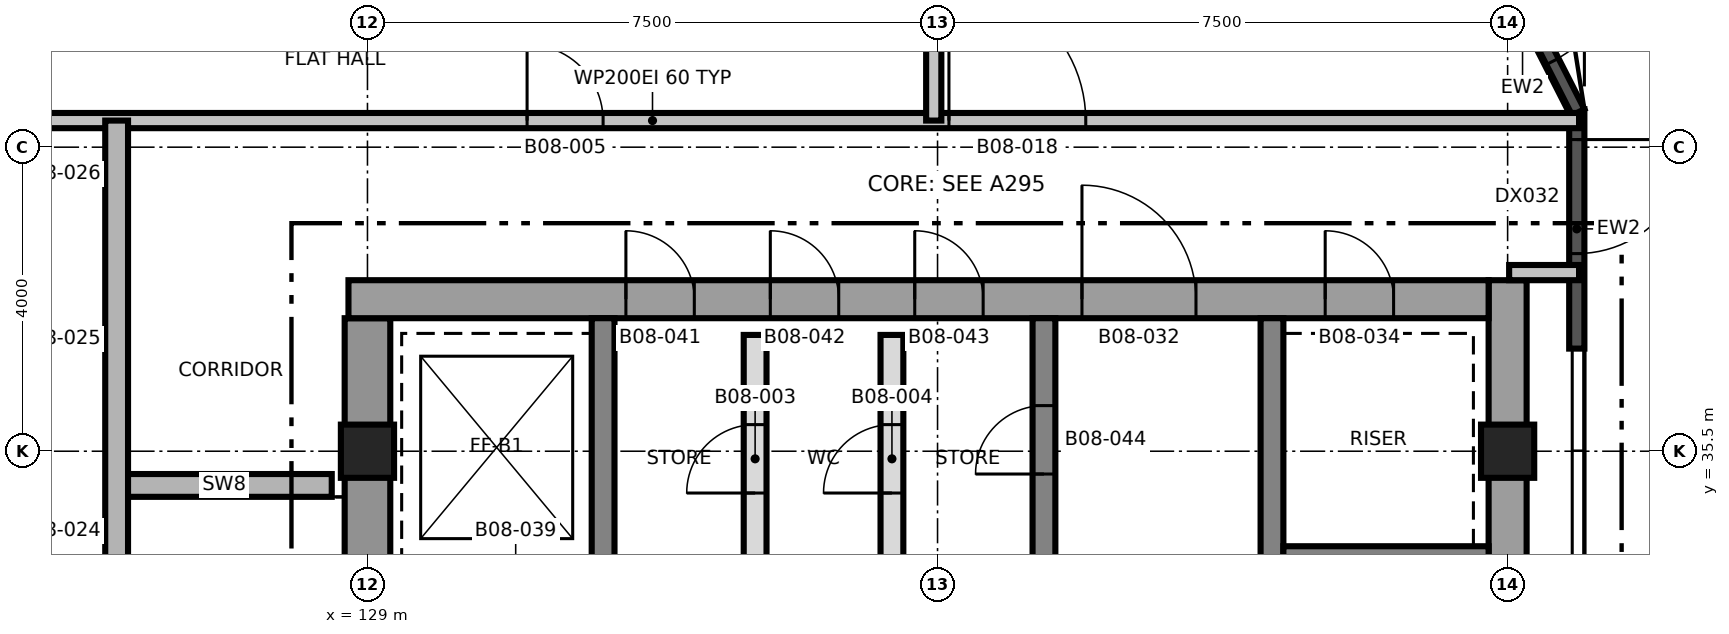
"""IFC4 building model, lengths in metres.
Left out: names, types, materials, properties, quantities, classifications, styles, units other than length and angle.
Written with IfcOpenShell. Run it as: python <this file> out.ifc"""

import sys

from ifc_helpers import new_model, si_unit, direction, frame, frame_2d, origin, origin_2d, place, context, subcontext, project, spatial, rectangle, extrude, element, fill, save


model = new_model("IFC4")
c1 = context("Model", 3, precision=1e-05, world=origin(), true_north=direction((0.0, 1.0)))
c2 = subcontext(c1, "Body", "Model", "MODEL_VIEW")
j1 = project(units=[si_unit("LENGTHUNIT", "METRE"), si_unit("PLANEANGLEUNIT", "RADIAN")], contexts=[c1])
p1 = place(None, origin())
s1 = spatial("IfcSite", under=j1, at=p1, CompositionType="ELEMENT")
p2 = place(p1, origin())
s2 = spatial("IfcBuilding", under=s1, at=p2, CompositionType="ELEMENT")
p3 = place(p2, frame((0.0, 0.0, 94.5)))
s3 = spatial("IfcBuildingStorey", under=s2, at=p3, CompositionType="ELEMENT", Elevation=94.5)
p4 = place(p3, frame((129.0, 24.75, 0.0), z_axis=(0.0, 0.0, 1.0), x_axis=(0.0, 1.0, 0.0)))
e1 = element("IfcWall", 1, at=p4, inside=s3, PredefinedType="SHEAR", context=c2, shape_type="SweptSolid", body=[
    extrude(rectangle(XDim=12.5, YDim=0.6, at=frame_2d((6.25, 0.0))), origin(), (0.0, 0.0, 1.0), 3.7),
])
p5 = place(p4, frame((5.15, 0.0, 0.0)))
e2 = element("IfcOpeningElement", 2, at=p5, cuts=e1, PredefinedType="OPENING", context=c2, shape_type="SweptSolid", body=[
    extrude(rectangle(XDim=1.0, YDim=2.1, at=frame_2d((0.5, 1.05))), frame((0.0, 0.31, 0.0), z_axis=(0.0, -1.0, 0.0), x_axis=(1.0, 0.0, 0.0)), (0.0, 0.0, 1.0), 0.62),
])
p6 = place(p3, frame((144.0, 24.25, 0.0), z_axis=(0.0, 0.0, 1.0), x_axis=(0.0, 1.0, 0.0)))
e3 = element("IfcWall", 3, at=p6, inside=s3, PredefinedType="SHEAR", context=c2, shape_type="SweptSolid", body=[
    extrude(rectangle(XDim=13.5, YDim=0.5, at=frame_2d((6.75, 0.0))), origin(), (0.0, 0.0, 1.0), 3.7),
])
p7 = place(p3, frame((128.75, 37.5, 0.0), z_axis=(0.0, 0.0, 1.0), x_axis=(1.0, 0.0, 0.0)))
e4 = element("IfcWall", 4, at=p7, inside=s3, PredefinedType="SHEAR", context=c2, shape_type="SweptSolid", body=[
    extrude(rectangle(XDim=15.0, YDim=0.5, at=frame_2d((7.5, 0.0))), origin(), (0.0, 0.0, 1.0), 3.7),
])
p8 = place(p7, frame((9.65, 0.0, 0.0)))
e5 = element("IfcOpeningElement", 5, at=p8, cuts=e4, PredefinedType="OPENING", context=c2, shape_type="SweptSolid", body=[
    extrude(rectangle(XDim=1.5, YDim=2.1, at=frame_2d((0.75, 1.05))), frame((0.0, 0.26, 0.0), z_axis=(0.0, -1.0, 0.0), x_axis=(1.0, 0.0, 0.0)), (0.0, 0.0, 1.0), 0.52),
])
p9 = place(p7, frame((12.85, 0.0, 0.0)))
e6 = element("IfcOpeningElement", 6, at=p9, cuts=e4, PredefinedType="OPENING", context=c2, shape_type="SweptSolid", body=[
    extrude(rectangle(XDim=0.9, YDim=2.1, at=frame_2d((0.45, 1.05))), frame((0.0, 0.26, 0.0), z_axis=(0.0, -1.0, 0.0), x_axis=(1.0, 0.0, 0.0)), (0.0, 0.0, 1.0), 0.52),
])
p10 = place(p7, frame((3.65, 0.0, 0.0)))
e7 = element("IfcOpeningElement", 7, at=p10, cuts=e4, PredefinedType="OPENING", context=c2, shape_type="SweptSolid", body=[
    extrude(rectangle(XDim=0.9, YDim=2.1, at=frame_2d((0.45, 1.05))), frame((0.0, 0.26, 0.0), z_axis=(0.0, -1.0, 0.0), x_axis=(1.0, 0.0, 0.0)), (0.0, 0.0, 1.0), 0.52),
])
p11 = place(p7, frame((5.55, 0.0, 0.0)))
e8 = element("IfcOpeningElement", 8, at=p11, cuts=e4, PredefinedType="OPENING", context=c2, shape_type="SweptSolid", body=[
    extrude(rectangle(XDim=0.9, YDim=2.1, at=frame_2d((0.45, 1.05))), frame((0.0, 0.26, 0.0), z_axis=(0.0, -1.0, 0.0), x_axis=(1.0, 0.0, 0.0)), (0.0, 0.0, 1.0), 0.52),
])
p12 = place(p7, frame((7.45, 0.0, 0.0)))
e9 = element("IfcOpeningElement", 9, at=p12, cuts=e4, PredefinedType="OPENING", context=c2, shape_type="SweptSolid", body=[
    extrude(rectangle(XDim=0.9, YDim=2.1, at=frame_2d((0.45, 1.05))), frame((0.0, 0.26, 0.0), z_axis=(0.0, -1.0, 0.0), x_axis=(1.0, 0.0, 0.0)), (0.0, 0.0, 1.0), 0.52),
])
p13 = place(p3, frame((132.1, 24.75, 0.0), z_axis=(0.0, 0.0, 1.0), x_axis=(0.0, 1.0, 0.0)))
e10 = element("IfcWall", 10, at=p13, inside=s3, PredefinedType="SHEAR", context=c2, shape_type="SweptSolid", body=[
    extrude(rectangle(XDim=12.5, YDim=0.3, at=frame_2d((6.25, 0.0))), origin(), (0.0, 0.0, 1.0), 3.7),
])
p14 = place(p13, frame((3.9, 0.0, 0.0)))
e11 = element("IfcOpeningElement", 11, at=p14, cuts=e10, PredefinedType="OPENING", context=c2, shape_type="SweptSolid", body=[
    extrude(rectangle(XDim=1.2, YDim=2.1, at=frame_2d((0.6, 1.05))), frame((0.0, 0.16, 0.0), z_axis=(0.0, -1.0, 0.0), x_axis=(1.0, 0.0, 0.0)), (0.0, 0.0, 1.0), 0.32),
])
p15 = place(p3, frame((137.9, 24.75, 0.0), z_axis=(0.0, 0.0, 1.0), x_axis=(0.0, 1.0, 0.0)))
e12 = element("IfcWall", 12, at=p15, inside=s3, PredefinedType="SHEAR", context=c2, shape_type="SweptSolid", body=[
    extrude(rectangle(XDim=12.5, YDim=0.3, at=frame_2d((6.25, 0.0))), origin(), (0.0, 0.0, 1.0), 3.7),
])
p16 = place(p15, frame((3.95, 0.0, 0.0)))
e13 = element("IfcOpeningElement", 13, at=p16, cuts=e12, PredefinedType="OPENING", context=c2, shape_type="SweptSolid", body=[
    extrude(rectangle(XDim=1.5, YDim=2.1, at=frame_2d((0.75, 1.05))), frame((0.0, 0.16, 0.0), z_axis=(0.0, -1.0, 0.0), x_axis=(1.0, 0.0, 0.0)), (0.0, 0.0, 1.0), 0.32),
])
p17 = place(p15, frame((10.45, 0.0, 0.0)))
e14 = element("IfcOpeningElement", 14, at=p17, cuts=e12, PredefinedType="OPENING", context=c2, shape_type="SweptSolid", body=[
    extrude(rectangle(XDim=0.9, YDim=2.1, at=frame_2d((0.45, 1.05))), frame((0.0, 0.16, 0.0), z_axis=(0.0, -1.0, 0.0), x_axis=(1.0, 0.0, 0.0)), (0.0, 0.0, 1.0), 0.32),
])
p18 = place(p3, frame((140.9, 24.75, 0.0), z_axis=(0.0, 0.0, 1.0), x_axis=(0.0, 1.0, 0.0)))
e15 = element("IfcWall", 15, at=p18, inside=s3, PredefinedType="SHEAR", context=c2, shape_type="SweptSolid", body=[
    extrude(rectangle(XDim=12.5, YDim=0.3, at=frame_2d((6.25, 0.0))), origin(), (0.0, 0.0, 1.0), 3.7),
])
p19 = place(p18, frame((5.9, 0.0, 0.0)))
e16 = element("IfcOpeningElement", 16, at=p19, cuts=e15, PredefinedType="OPENING", context=c2, shape_type="SweptSolid", body=[
    extrude(rectangle(XDim=1.2, YDim=2.1, at=frame_2d((0.6, 1.05))), frame((0.0, 0.16, 0.0), z_axis=(0.0, -1.0, 0.0), x_axis=(1.0, 0.0, 0.0)), (0.0, 0.0, 1.0), 0.32),
])
p20 = place(p3, frame((141.05, 34.1, 0.0), z_axis=(0.0, 0.0, 1.0), x_axis=(1.0, 0.0, 0.0)))
e17 = element("IfcWall", 17, at=p20, inside=s3, PredefinedType="SHEAR", context=c2, shape_type="SweptSolid", body=[
    extrude(rectangle(XDim=2.7, YDim=0.3, at=frame_2d((1.35, 0.0))), origin(), (0.0, 0.0, 1.0), 3.7),
])
for number, where, z_axis, x_axis in (
    (18, (129.0, 35.5, 0.0), (0.0, 0.0, 1.0), (1.0, 0.0, 0.0)),
    (19, (144.0, 35.5, 0.0), (0.0, 0.0, 1.0), (1.0, 0.0, 0.0)),
):
    element("IfcColumn", number, at=place(p3, frame(where, z_axis=z_axis, x_axis=x_axis)), inside=s3, PredefinedType="COLUMN", context=c2, shape_type="SweptSolid", body=[
        extrude(rectangle(XDim=0.7, YDim=0.7, at=origin_2d()), origin(), (0.0, 0.0, 1.0), 3.7),
    ])
p21 = place(p3, frame((144.91, 40.0, 0.0), z_axis=(0.0, 0.0, 1.0), x_axis=(0.0, -1.0, 0.0)))
e20 = element("IfcWall", 20, at=p21, inside=s3, PredefinedType="SOLIDWALL", context=c2, shape_type="SweptSolid", body=[
    extrude(rectangle(XDim=3.15, YDim=0.2, at=frame_2d((1.575, 0.0))), origin(), (0.0, 0.0, 1.0), 3.4),
])
p22 = place(p21, frame((0.4, 0.0, 0.0)))
e21 = element("IfcOpeningElement", 21, at=p22, cuts=e20, PredefinedType="OPENING", context=c2, shape_type="SweptSolid", body=[
    extrude(rectangle(XDim=1.5, YDim=2.4, at=frame_2d((0.75, 1.2))), frame((0.0, 0.11, 0.0), z_axis=(0.0, -1.0, 0.0), x_axis=(1.0, 0.0, 0.0)), (0.0, 0.0, 1.0), 0.22),
])
p23 = place(p3, frame((143.472, 42.799, 0.0), z_axis=(0.0, 0.0, 1.0), x_axis=(0.453962447346, -0.89102081704, 0.0)))
e22 = element("IfcWall", 22, at=p23, inside=s3, PredefinedType="SOLIDWALL", context=c2, shape_type="SweptSolid", body=[
    extrude(rectangle(XDim=3.192, YDim=0.2, at=frame_2d((1.596, 0.0))), origin(), (0.0, 0.0, 1.0), 3.4),
])
p24 = place(p23, frame((0.642, 0.0, 0.0)))
e23 = element("IfcOpeningElement", 23, at=p24, cuts=e22, PredefinedType="OPENING", context=c2, shape_type="SweptSolid", body=[
    extrude(rectangle(XDim=1.8, YDim=2.4, at=frame_2d((0.9, 1.2))), frame((0.0, 0.11, 0.0), z_axis=(0.0, -1.0, 0.0), x_axis=(1.0, 0.0, 0.0)), (0.0, 0.0, 1.0), 0.22),
])
p25 = place(p3, frame((125.7, 35.05, 0.0), z_axis=(0.0, 0.0, 1.0), x_axis=(1.0, 0.0, 0.0)))
e24 = element("IfcWall", 24, at=p25, inside=s3, PredefinedType="SHEAR", context=c2, shape_type="SweptSolid", body=[
    extrude(rectangle(XDim=2.83, YDim=0.3, at=frame_2d((1.415, 0.0))), origin(), (0.0, 0.0, 1.0), 3.4),
])
p26 = place(p3, frame((144.02, 37.85, 0.0), z_axis=(0.0, 0.0, 1.0), x_axis=(1.0, 0.0, 0.0)))
e25 = element("IfcWall", 25, at=p26, inside=s3, PredefinedType="PARTITIONING", context=c2, shape_type="SweptSolid", body=[
    extrude(rectangle(XDim=0.92, YDim=0.2, at=frame_2d((0.46, 0.0))), origin(), (0.0, 0.0, 1.0), 3.4),
])
p27 = place(p3, frame((120.56, 39.85, 0.0), z_axis=(0.0, 0.0, 1.0), x_axis=(1.0, 0.0, 0.0)))
e26 = element("IfcWall", 26, at=p27, inside=s3, PredefinedType="PARTITIONING", context=c2, shape_type="SweptSolid", body=[
    extrude(rectangle(XDim=24.38, YDim=0.2, at=frame_2d((12.19, 0.0))), origin(), (0.0, 0.0, 1.0), 3.4),
])
p28 = place(p27, frame((10.54, 0.0, 0.0)))
e27 = element("IfcOpeningElement", 27, at=p28, cuts=e26, PredefinedType="OPENING", context=c2, shape_type="SweptSolid", body=[
    extrude(rectangle(XDim=1.0, YDim=2.1, at=frame_2d((0.5, 1.05))), frame((0.0, 0.11, 0.0), z_axis=(0.0, -1.0, 0.0), x_axis=(1.0, 0.0, 0.0)), (0.0, 0.0, 1.0), 0.22),
])
p29 = place(p27, frame((16.09, 0.0, 0.0)))
e28 = element("IfcOpeningElement", 28, at=p29, cuts=e26, PredefinedType="OPENING", context=c2, shape_type="SweptSolid", body=[
    extrude(rectangle(XDim=1.8, YDim=2.1, at=frame_2d((0.9, 1.05))), frame((0.0, 0.11, 0.0), z_axis=(0.0, -1.0, 0.0), x_axis=(1.0, 0.0, 0.0)), (0.0, 0.0, 1.0), 0.22),
])
p30 = place(p3, frame((125.7, 22.15, 0.0), z_axis=(0.0, 0.0, 1.0), x_axis=(0.0, 1.0, 0.0)))
e29 = element("IfcWall", 29, at=p30, inside=s3, PredefinedType="SHEAR", context=c2, shape_type="SweptSolid", body=[
    extrude(rectangle(XDim=17.7, YDim=0.3, at=frame_2d((8.85, 0.0))), origin(), (0.0, 0.0, 1.0), 3.4),
])
p31 = place(p30, frame((2.7, 0.0, 0.0)))
e30 = element("IfcOpeningElement", 30, at=p31, cuts=e29, PredefinedType="OPENING", context=c2, shape_type="SweptSolid", body=[
    extrude(rectangle(XDim=1.0, YDim=2.1, at=frame_2d((0.5, 1.05))), frame((0.0, 0.16, 0.0), z_axis=(0.0, -1.0, 0.0), x_axis=(1.0, 0.0, 0.0)), (0.0, 0.0, 1.0), 0.32),
])
p32 = place(p3, frame((134.1, 33.77, 0.0), z_axis=(0.0, 0.0, 1.0), x_axis=(0.0, 1.0, 0.0)))
e31 = element("IfcWall", 31, at=p32, inside=s3, PredefinedType="PARTITIONING", context=c2, shape_type="SweptSolid", body=[
    extrude(rectangle(XDim=3.26, YDim=0.3, at=frame_2d((1.63, 0.0))), origin(), (0.0, 0.0, 1.0), 3.4),
])
p33 = place(p32, frame((1.18, 0.0, 0.0)))
e32 = element("IfcOpeningElement", 32, at=p33, cuts=e31, PredefinedType="OPENING", context=c2, shape_type="SweptSolid", body=[
    extrude(rectangle(XDim=0.9, YDim=2.1, at=frame_2d((0.45, 1.05))), frame((0.0, 0.16, 0.0), z_axis=(0.0, -1.0, 0.0), x_axis=(1.0, 0.0, 0.0)), (0.0, 0.0, 1.0), 0.32),
])
p34 = place(p3, frame((135.9, 33.77, 0.0), z_axis=(0.0, 0.0, 1.0), x_axis=(0.0, 1.0, 0.0)))
e33 = element("IfcWall", 33, at=p34, inside=s3, PredefinedType="PARTITIONING", context=c2, shape_type="SweptSolid", body=[
    extrude(rectangle(XDim=3.26, YDim=0.3, at=frame_2d((1.63, 0.0))), origin(), (0.0, 0.0, 1.0), 3.4),
])
p35 = place(p34, frame((1.18, 0.0, 0.0)))
e34 = element("IfcOpeningElement", 34, at=p35, cuts=e33, PredefinedType="OPENING", context=c2, shape_type="SweptSolid", body=[
    extrude(rectangle(XDim=0.9, YDim=2.1, at=frame_2d((0.45, 1.05))), frame((0.0, 0.16, 0.0), z_axis=(0.0, -1.0, 0.0), x_axis=(1.0, 0.0, 0.0)), (0.0, 0.0, 1.0), 0.32),
])
p36 = place(p3, frame((136.45, 39.85, 0.0), z_axis=(0.0, 0.0, 1.0), x_axis=(0.0, 1.0, 0.0)))
e35 = element("IfcWall", 35, at=p36, inside=s3, PredefinedType="PARTITIONING", context=c2, shape_type="SweptSolid", body=[
    extrude(rectangle(XDim=5.59, YDim=0.2, at=frame_2d((2.795, 0.0))), origin(), (0.0, 0.0, 1.0), 3.4),
])
p37 = place(p22, origin())
e36 = element("IfcDoor", 36, at=p37, inside=s3, OperationType="SINGLE_SWING_LEFT", PredefinedType="DOOR", context=c2, shape_type="SweptSolid", body=[
    extrude(rectangle(XDim=1.5, YDim=2.4, at=frame_2d((0.75, 1.2))), frame((0.0, 0.025, 0.0), z_axis=(0.0, -1.0, 0.0), x_axis=(1.0, 0.0, 0.0)), (0.0, 0.0, 1.0), 0.05),
])
fill(e21, e36)
p38 = place(p24, origin())
e37 = element("IfcDoor", 37, at=p38, inside=s3, OperationType="SINGLE_SWING_LEFT", PredefinedType="DOOR", context=c2, shape_type="SweptSolid", body=[
    extrude(rectangle(XDim=1.8, YDim=2.4, at=frame_2d((0.9, 1.2))), frame((0.0, 0.025, 0.0), z_axis=(0.0, -1.0, 0.0), x_axis=(1.0, 0.0, 0.0)), (0.0, 0.0, 1.0), 0.05),
])
fill(e23, e37)
p39 = place(p33, origin())
e38 = element("IfcDoor", 38, at=p39, inside=s3, OperationType="SINGLE_SWING_LEFT", PredefinedType="DOOR", context=c2, shape_type="SweptSolid", body=[
    extrude(rectangle(XDim=0.9, YDim=2.1, at=frame_2d((0.45, 1.05))), frame((0.0, 0.025, 0.0), z_axis=(0.0, -1.0, 0.0), x_axis=(1.0, 0.0, 0.0)), (0.0, 0.0, 1.0), 0.05),
])
fill(e32, e38)
p40 = place(p35, origin())
e39 = element("IfcDoor", 39, at=p40, inside=s3, OperationType="SINGLE_SWING_RIGHT", PredefinedType="DOOR", context=c2, shape_type="SweptSolid", body=[
    extrude(rectangle(XDim=0.9, YDim=2.1, at=frame_2d((0.45, 1.05))), frame((0.0, 0.025, 0.0), z_axis=(0.0, -1.0, 0.0), x_axis=(1.0, 0.0, 0.0)), (0.0, 0.0, 1.0), 0.05),
])
fill(e34, e39)
p41 = place(p28, origin())
e40 = element("IfcDoor", 40, at=p41, inside=s3, OperationType="SINGLE_SWING_LEFT", PredefinedType="DOOR", context=c2, shape_type="SweptSolid", body=[
    extrude(rectangle(XDim=1.0, YDim=2.1, at=frame_2d((0.5, 1.05))), frame((0.0, 0.025, 0.0), z_axis=(0.0, -1.0, 0.0), x_axis=(1.0, 0.0, 0.0)), (0.0, 0.0, 1.0), 0.05),
])
fill(e27, e40)
p42 = place(p29, origin())
e41 = element("IfcDoor", 41, at=p42, inside=s3, OperationType="SINGLE_SWING_RIGHT", PredefinedType="DOOR", context=c2, shape_type="SweptSolid", body=[
    extrude(rectangle(XDim=1.8, YDim=2.1, at=frame_2d((0.9, 1.05))), frame((0.0, 0.025, 0.0), z_axis=(0.0, -1.0, 0.0), x_axis=(1.0, 0.0, 0.0)), (0.0, 0.0, 1.0), 0.05),
])
fill(e28, e41)
p43 = place(p8, origin())
e42 = element("IfcDoor", 42, at=p43, inside=s3, OperationType="SINGLE_SWING_RIGHT", PredefinedType="DOOR", context=c2, shape_type="SweptSolid", body=[
    extrude(rectangle(XDim=1.5, YDim=2.1, at=frame_2d((0.75, 1.05))), frame((0.0, 0.025, 0.0), z_axis=(0.0, -1.0, 0.0), x_axis=(1.0, 0.0, 0.0)), (0.0, 0.0, 1.0), 0.05),
])
fill(e5, e42)
p44 = place(p9, origin())
e43 = element("IfcDoor", 43, at=p44, inside=s3, OperationType="SINGLE_SWING_RIGHT", PredefinedType="DOOR", context=c2, shape_type="SweptSolid", body=[
    extrude(rectangle(XDim=0.9, YDim=2.1, at=frame_2d((0.45, 1.05))), frame((0.0, 0.025, 0.0), z_axis=(0.0, -1.0, 0.0), x_axis=(1.0, 0.0, 0.0)), (0.0, 0.0, 1.0), 0.05),
])
fill(e6, e43)
p45 = place(p10, origin())
e44 = element("IfcDoor", 44, at=p45, inside=s3, OperationType="SINGLE_SWING_LEFT", PredefinedType="DOOR", context=c2, shape_type="SweptSolid", body=[
    extrude(rectangle(XDim=0.9, YDim=2.1, at=frame_2d((0.45, 1.05))), frame((0.0, 0.025, 0.0), z_axis=(0.0, -1.0, 0.0), x_axis=(1.0, 0.0, 0.0)), (0.0, 0.0, 1.0), 0.05),
])
fill(e7, e44)
p46 = place(p11, origin())
e45 = element("IfcDoor", 45, at=p46, inside=s3, OperationType="SINGLE_SWING_RIGHT", PredefinedType="DOOR", context=c2, shape_type="SweptSolid", body=[
    extrude(rectangle(XDim=0.9, YDim=2.1, at=frame_2d((0.45, 1.05))), frame((0.0, 0.025, 0.0), z_axis=(0.0, -1.0, 0.0), x_axis=(1.0, 0.0, 0.0)), (0.0, 0.0, 1.0), 0.05),
])
fill(e8, e45)
p47 = place(p12, origin())
e46 = element("IfcDoor", 46, at=p47, inside=s3, OperationType="SINGLE_SWING_LEFT", PredefinedType="DOOR", context=c2, shape_type="SweptSolid", body=[
    extrude(rectangle(XDim=0.9, YDim=2.1, at=frame_2d((0.45, 1.05))), frame((0.0, 0.025, 0.0), z_axis=(0.0, -1.0, 0.0), x_axis=(1.0, 0.0, 0.0)), (0.0, 0.0, 1.0), 0.05),
])
fill(e9, e46)
p48 = place(p17, origin())
e47 = element("IfcDoor", 47, at=p48, inside=s3, OperationType="SINGLE_SWING_RIGHT", PredefinedType="DOOR", context=c2, shape_type="SweptSolid", body=[
    extrude(rectangle(XDim=0.9, YDim=2.1, at=frame_2d((0.45, 1.05))), frame((0.0, 0.025, 0.0), z_axis=(0.0, -1.0, 0.0), x_axis=(1.0, 0.0, 0.0)), (0.0, 0.0, 1.0), 0.05),
])
fill(e14, e47)
save(model, sys.argv[1])
